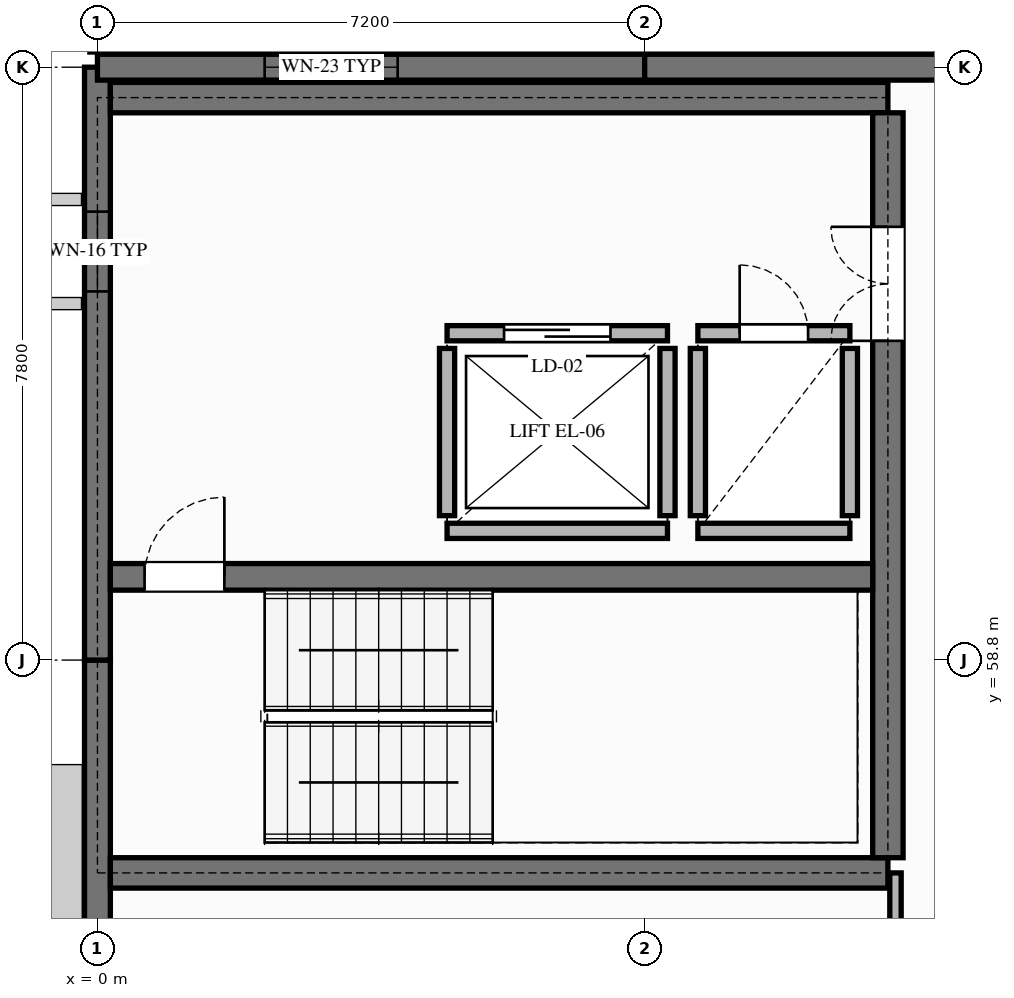
"""IFC4 building model, lengths in metres.
Left out: names, types, materials, properties, quantities, classifications, styles, units other than length and angle.
Written with IfcOpenShell. Run it as: python <this file> out.ifc"""

import sys

from ifc_helpers import new_model, si_unit, direction, frame, frame_2d, origin, place, context, subcontext, project, spatial, rectangle, extrude, element, fill, save


model = new_model("IFC4")
c1 = context("Model", 3, precision=1e-05, world=origin(), true_north=direction((0.0, 1.0)))
c2 = subcontext(c1, "Body", "Model", "MODEL_VIEW")
j1 = project(units=[si_unit("LENGTHUNIT", "METRE"), si_unit("PLANEANGLEUNIT", "RADIAN")], contexts=[c1])
p1 = place(None, origin())
s1 = spatial("IfcSite", under=j1, at=p1, CompositionType="ELEMENT")
p2 = place(p1, origin())
s2 = spatial("IfcBuilding", under=s1, at=p2, CompositionType="ELEMENT")
p3 = place(p2, frame((0.0, 0.0, 12.78)))
s3 = spatial("IfcBuildingStorey", under=s2, at=p3, CompositionType="ELEMENT", Elevation=12.78)
p4 = place(p3, frame((0.0, 51.0, 0.0), z_axis=(0.0, 0.0, 1.0), x_axis=(0.0, 1.0, 0.0)))
e1 = element("IfcWall", 1, at=p4, inside=s3, PredefinedType="SOLIDWALL", context=c2, shape_type="SweptSolid", body=[
    extrude(rectangle(XDim=7.8, YDim=0.34, at=frame_2d((3.9, 0.0))), origin(), (0.0, 0.0, 1.0), 3.42),
])
p5 = place(p4, frame((1.5, 0.0, 0.85)))
e2 = element("IfcOpeningElement", 2, at=p5, cuts=e1, PredefinedType="OPENING", context=c2, shape_type="SweptSolid", body=[
    extrude(rectangle(XDim=2.05, YDim=1.85, at=frame_2d((1.025, 0.925))), frame((0.0, 0.18, 0.0), z_axis=(0.0, -1.0, 0.0), x_axis=(1.0, 0.0, 0.0)), (0.0, 0.0, 1.0), 0.36),
])
p6 = place(p3, frame((0.0, 58.8, 0.0), z_axis=(0.0, 0.0, 1.0), x_axis=(0.0, 1.0, 0.0)))
e3 = element("IfcWall", 3, at=p6, inside=s3, PredefinedType="SOLIDWALL", context=c2, shape_type="SweptSolid", body=[
    extrude(rectangle(XDim=7.8, YDim=0.34, at=frame_2d((3.9, 0.0))), origin(), (0.0, 0.0, 1.0), 3.42),
])
p7 = place(p6, frame((4.85, 0.0, 1.1)))
e4 = element("IfcOpeningElement", 4, at=p7, cuts=e3, PredefinedType="OPENING", context=c2, shape_type="SweptSolid", body=[
    extrude(rectangle(XDim=1.05, YDim=1.75, at=frame_2d((0.525, 0.875))), frame((0.0, 0.18, 0.0), z_axis=(0.0, -1.0, 0.0), x_axis=(1.0, 0.0, 0.0)), (0.0, 0.0, 1.0), 0.36),
])
p8 = place(p3, frame((0.0, 66.6, 0.0), z_axis=(0.0, 0.0, 1.0), x_axis=(1.0, 0.0, 0.0)))
e5 = element("IfcWall", 5, at=p8, inside=s3, PredefinedType="SOLIDWALL", context=c2, shape_type="SweptSolid", body=[
    extrude(rectangle(XDim=7.2, YDim=0.34, at=frame_2d((3.6, 0.0))), origin(), (0.0, 0.0, 1.0), 3.42),
])
p9 = place(p8, frame((2.2, 0.0, 0.9)))
e6 = element("IfcOpeningElement", 6, at=p9, cuts=e5, PredefinedType="OPENING", context=c2, shape_type="SweptSolid", body=[
    extrude(rectangle(XDim=1.75, YDim=2.15, at=frame_2d((0.875, 1.075))), frame((0.0, 0.18, 0.0), z_axis=(0.0, -1.0, 0.0), x_axis=(1.0, 0.0, 0.0)), (0.0, 0.0, 1.0), 0.36),
])
p10 = place(p3, frame((7.2, 66.6, 0.0), z_axis=(0.0, 0.0, 1.0), x_axis=(1.0, 0.0, 0.0)))
e7 = element("IfcWall", 7, at=p10, inside=s3, PredefinedType="SOLIDWALL", context=c2, shape_type="SweptSolid", body=[
    extrude(rectangle(XDim=7.2, YDim=0.34, at=frame_2d((3.6, 0.0))), origin(), (0.0, 0.0, 1.0), 3.42),
])
p11 = place(p10, frame((4.4, 0.0, 0.9)))
e8 = element("IfcOpeningElement", 8, at=p11, cuts=e7, PredefinedType="OPENING", context=c2, shape_type="SweptSolid", body=[
    extrude(rectangle(XDim=1.75, YDim=2.15, at=frame_2d((0.875, 1.075))), frame((0.0, 0.18, 0.0), z_axis=(0.0, -1.0, 0.0), x_axis=(1.0, 0.0, 0.0)), (0.0, 0.0, 1.0), 0.36),
])
for number, where, z_axis, x_axis in (
    (9, (0.17, 56.0, 0.0), (0.0, 0.0, 1.0), (1.0, 0.0, 0.0)),
    (10, (0.17, 66.2, 0.0), (0.0, 0.0, 1.0), (1.0, 0.0, 0.0)),
):
    element("IfcWall", number, at=place(p3, frame(where, z_axis=z_axis, x_axis=x_axis)), inside=s3, PredefinedType="SHEAR", context=c2, shape_type="SweptSolid", body=[
        extrude(rectangle(XDim=10.23, YDim=0.4, at=frame_2d((5.115, 0.0))), origin(), (0.0, 0.0, 1.0), 3.42),
    ])
p12 = place(p3, frame((10.4, 56.2, 0.0), z_axis=(0.0, 0.0, 1.0), x_axis=(0.0, 1.0, 0.0)))
e11 = element("IfcWall", 11, at=p12, inside=s3, PredefinedType="SHEAR", context=c2, shape_type="SweptSolid", body=[
    extrude(rectangle(XDim=9.8, YDim=0.4, at=frame_2d((4.9, 0.0))), origin(), (0.0, 0.0, 1.0), 3.42),
])
p13 = place(p12, frame((6.8, 0.0, 0.0)))
e12 = element("IfcOpeningElement", 12, at=p13, cuts=e11, PredefinedType="OPENING", context=c2, shape_type="SweptSolid", body=[
    extrude(rectangle(XDim=1.5, YDim=2.2, at=frame_2d((0.75, 1.1))), frame((0.0, 0.21, 0.0), z_axis=(0.0, -1.0, 0.0), x_axis=(1.0, 0.0, 0.0)), (0.0, 0.0, 1.0), 0.42),
])
p14 = place(p3, frame((0.17, 59.895, 0.0), z_axis=(0.0, 0.0, 1.0), x_axis=(1.0, 0.0, 0.0)))
e13 = element("IfcWall", 13, at=p14, inside=s3, PredefinedType="SHEAR", context=c2, shape_type="SweptSolid", body=[
    extrude(rectangle(XDim=10.03, YDim=0.35, at=frame_2d((5.015, 0.0))), origin(), (0.0, 0.0, 1.0), 3.42),
])
p15 = place(p14, frame((0.45, 0.0, 0.0)))
e14 = element("IfcOpeningElement", 14, at=p15, cuts=e13, PredefinedType="OPENING", context=c2, shape_type="SweptSolid", body=[
    extrude(rectangle(XDim=1.05, YDim=2.2, at=frame_2d((0.525, 1.1))), frame((0.0, 0.185, 0.0), z_axis=(0.0, -1.0, 0.0), x_axis=(1.0, 0.0, 0.0)), (0.0, 0.0, 1.0), 0.37),
])
p16 = place(p3, frame((4.6, 60.5, 0.0), z_axis=(0.0, 0.0, 1.0), x_axis=(1.0, 0.0, 0.0)))
e15 = element("IfcWall", 15, at=p16, inside=s3, PredefinedType="PARTITIONING", context=c2, shape_type="SweptSolid", body=[
    extrude(rectangle(XDim=2.9, YDim=0.2, at=frame_2d((1.45, 0.0))), origin(), (0.0, 0.0, 1.0), 3.42),
])
p17 = place(p3, frame((4.6, 63.1, 0.0), z_axis=(0.0, 0.0, 1.0), x_axis=(1.0, 0.0, 0.0)))
e16 = element("IfcWall", 16, at=p17, inside=s3, PredefinedType="PARTITIONING", context=c2, shape_type="SweptSolid", body=[
    extrude(rectangle(XDim=2.9, YDim=0.2, at=frame_2d((1.45, 0.0))), origin(), (0.0, 0.0, 1.0), 3.42),
])
p18 = place(p17, frame((0.75, 0.0, 0.0)))
e17 = element("IfcOpeningElement", 17, at=p18, cuts=e16, PredefinedType="OPENING", context=c2, shape_type="SweptSolid", body=[
    extrude(rectangle(XDim=1.4, YDim=2.25, at=frame_2d((0.7, 1.125))), frame((0.0, 0.11, 0.0), z_axis=(0.0, -1.0, 0.0), x_axis=(1.0, 0.0, 0.0)), (0.0, 0.0, 1.0), 0.22),
])
for number, where, z_axis, x_axis in (
    (18, (4.6, 60.7, 0.0), (0.0, 0.0, 1.0), (0.0, 1.0, 0.0)),
    (19, (7.5, 60.7, 0.0), (0.0, 0.0, 1.0), (0.0, 1.0, 0.0)),
):
    element("IfcWall", number, at=place(p3, frame(where, z_axis=z_axis, x_axis=x_axis)), inside=s3, PredefinedType="PARTITIONING", context=c2, shape_type="SweptSolid", body=[
        extrude(rectangle(XDim=2.2, YDim=0.2, at=frame_2d((1.1, 0.0))), origin(), (0.0, 0.0, 1.0), 3.42),
    ])
p19 = place(p3, frame((7.9, 60.5, 0.0), z_axis=(0.0, 0.0, 1.0), x_axis=(1.0, 0.0, 0.0)))
e20 = element("IfcWall", 20, at=p19, inside=s3, PredefinedType="PARTITIONING", context=c2, shape_type="SweptSolid", body=[
    extrude(rectangle(XDim=2.0, YDim=0.2, at=frame_2d((1.0, 0.0))), origin(), (0.0, 0.0, 1.0), 3.42),
])
p20 = place(p3, frame((7.9, 63.1, 0.0), z_axis=(0.0, 0.0, 1.0), x_axis=(1.0, 0.0, 0.0)))
e21 = element("IfcWall", 21, at=p20, inside=s3, PredefinedType="PARTITIONING", context=c2, shape_type="SweptSolid", body=[
    extrude(rectangle(XDim=2.0, YDim=0.2, at=frame_2d((1.0, 0.0))), origin(), (0.0, 0.0, 1.0), 3.42),
])
p21 = place(p20, frame((0.55, 0.0, 0.0)))
e22 = element("IfcOpeningElement", 22, at=p21, cuts=e21, PredefinedType="OPENING", context=c2, shape_type="SweptSolid", body=[
    extrude(rectangle(XDim=0.9, YDim=2.1, at=frame_2d((0.45, 1.05))), frame((0.0, 0.11, 0.0), z_axis=(0.0, -1.0, 0.0), x_axis=(1.0, 0.0, 0.0)), (0.0, 0.0, 1.0), 0.22),
])
for number, where, z_axis, x_axis in (
    (23, (7.9, 60.7, 0.0), (0.0, 0.0, 1.0), (0.0, 1.0, 0.0)),
    (24, (9.9, 60.7, 0.0), (0.0, 0.0, 1.0), (0.0, 1.0, 0.0)),
):
    element("IfcWall", number, at=place(p3, frame(where, z_axis=z_axis, x_axis=x_axis)), inside=s3, PredefinedType="PARTITIONING", context=c2, shape_type="SweptSolid", body=[
        extrude(rectangle(XDim=2.2, YDim=0.2, at=frame_2d((1.1, 0.0))), origin(), (0.0, 0.0, 1.0), 3.42),
    ])
p22 = place(p3, frame((10.5, 36.0, 0.0), z_axis=(0.0, 0.0, 1.0), x_axis=(0.0, 1.0, 0.0)))
e25 = element("IfcWall", 25, at=p22, inside=s3, PredefinedType="PARTITIONING", context=c2, shape_type="SweptSolid", body=[
    extrude(rectangle(XDim=20.0, YDim=0.15, at=frame_2d((10.0, 0.0))), origin(), (0.0, 0.0, 1.0), 3.42),
])
p23 = place(p22, frame((8.5, 0.0, 0.0)))
e26 = element("IfcOpeningElement", 26, at=p23, cuts=e25, PredefinedType="OPENING", context=c2, shape_type="SweptSolid", body=[
    extrude(rectangle(XDim=1.0, YDim=2.15, at=frame_2d((0.5, 1.075))), frame((0.0, 0.085, 0.0), z_axis=(0.0, -1.0, 0.0), x_axis=(1.0, 0.0, 0.0)), (0.0, 0.0, 1.0), 0.17),
])
p24 = place(p7, origin())
e27 = element("IfcWindow", 27, at=p24, inside=s3, PartitioningType="SINGLE_PANEL", PredefinedType="WINDOW", context=c2, shape_type="SweptSolid", body=[
    extrude(rectangle(XDim=1.05, YDim=1.75, at=frame_2d((0.525, 0.875))), frame((0.0, 0.03, 0.0), z_axis=(0.0, -1.0, 0.0), x_axis=(1.0, 0.0, 0.0)), (0.0, 0.0, 1.0), 0.06),
])
fill(e4, e27)
p25 = place(p9, origin())
e28 = element("IfcWindow", 28, at=p25, inside=s3, PartitioningType="SINGLE_PANEL", PredefinedType="WINDOW", context=c2, shape_type="SweptSolid", body=[
    extrude(rectangle(XDim=1.75, YDim=2.15, at=frame_2d((0.875, 1.075))), frame((0.0, 0.03, 0.0), z_axis=(0.0, -1.0, 0.0), x_axis=(1.0, 0.0, 0.0)), (0.0, 0.0, 1.0), 0.06),
])
fill(e6, e28)
p26 = place(p13, origin())
e29 = element("IfcDoor", 29, at=p26, inside=s3, OperationType="DOUBLE_DOOR_SINGLE_SWING", PredefinedType="DOOR", context=c2, shape_type="SweptSolid", body=[
    extrude(rectangle(XDim=1.5, YDim=2.2, at=frame_2d((0.75, 1.1))), frame((0.0, 0.025, 0.0), z_axis=(0.0, -1.0, 0.0), x_axis=(1.0, 0.0, 0.0)), (0.0, 0.0, 1.0), 0.05),
])
fill(e12, e29)
p27 = place(p15, origin())
e30 = element("IfcDoor", 30, at=p27, inside=s3, OperationType="SINGLE_SWING_RIGHT", PredefinedType="DOOR", context=c2, shape_type="SweptSolid", body=[
    extrude(rectangle(XDim=1.05, YDim=2.2, at=frame_2d((0.525, 1.1))), frame((0.0, 0.025, 0.0), z_axis=(0.0, -1.0, 0.0), x_axis=(1.0, 0.0, 0.0)), (0.0, 0.0, 1.0), 0.05),
])
fill(e14, e30)
p28 = place(p18, origin())
e31 = element("IfcDoor", 31, at=p28, inside=s3, OperationType="SLIDING_TO_LEFT", PredefinedType="DOOR", context=c2, shape_type="SweptSolid", body=[
    extrude(rectangle(XDim=1.4, YDim=2.25, at=frame_2d((0.7, 1.125))), frame((0.0, 0.025, 0.0), z_axis=(0.0, -1.0, 0.0), x_axis=(1.0, 0.0, 0.0)), (0.0, 0.0, 1.0), 0.05),
])
fill(e17, e31)
p29 = place(p21, origin())
e32 = element("IfcDoor", 32, at=p29, inside=s3, OperationType="SINGLE_SWING_LEFT", PredefinedType="DOOR", context=c2, shape_type="SweptSolid", body=[
    extrude(rectangle(XDim=0.9, YDim=2.1, at=frame_2d((0.45, 1.05))), frame((0.0, 0.025, 0.0), z_axis=(0.0, -1.0, 0.0), x_axis=(1.0, 0.0, 0.0)), (0.0, 0.0, 1.0), 0.05),
])
fill(e22, e32)
save(model, sys.argv[1])
